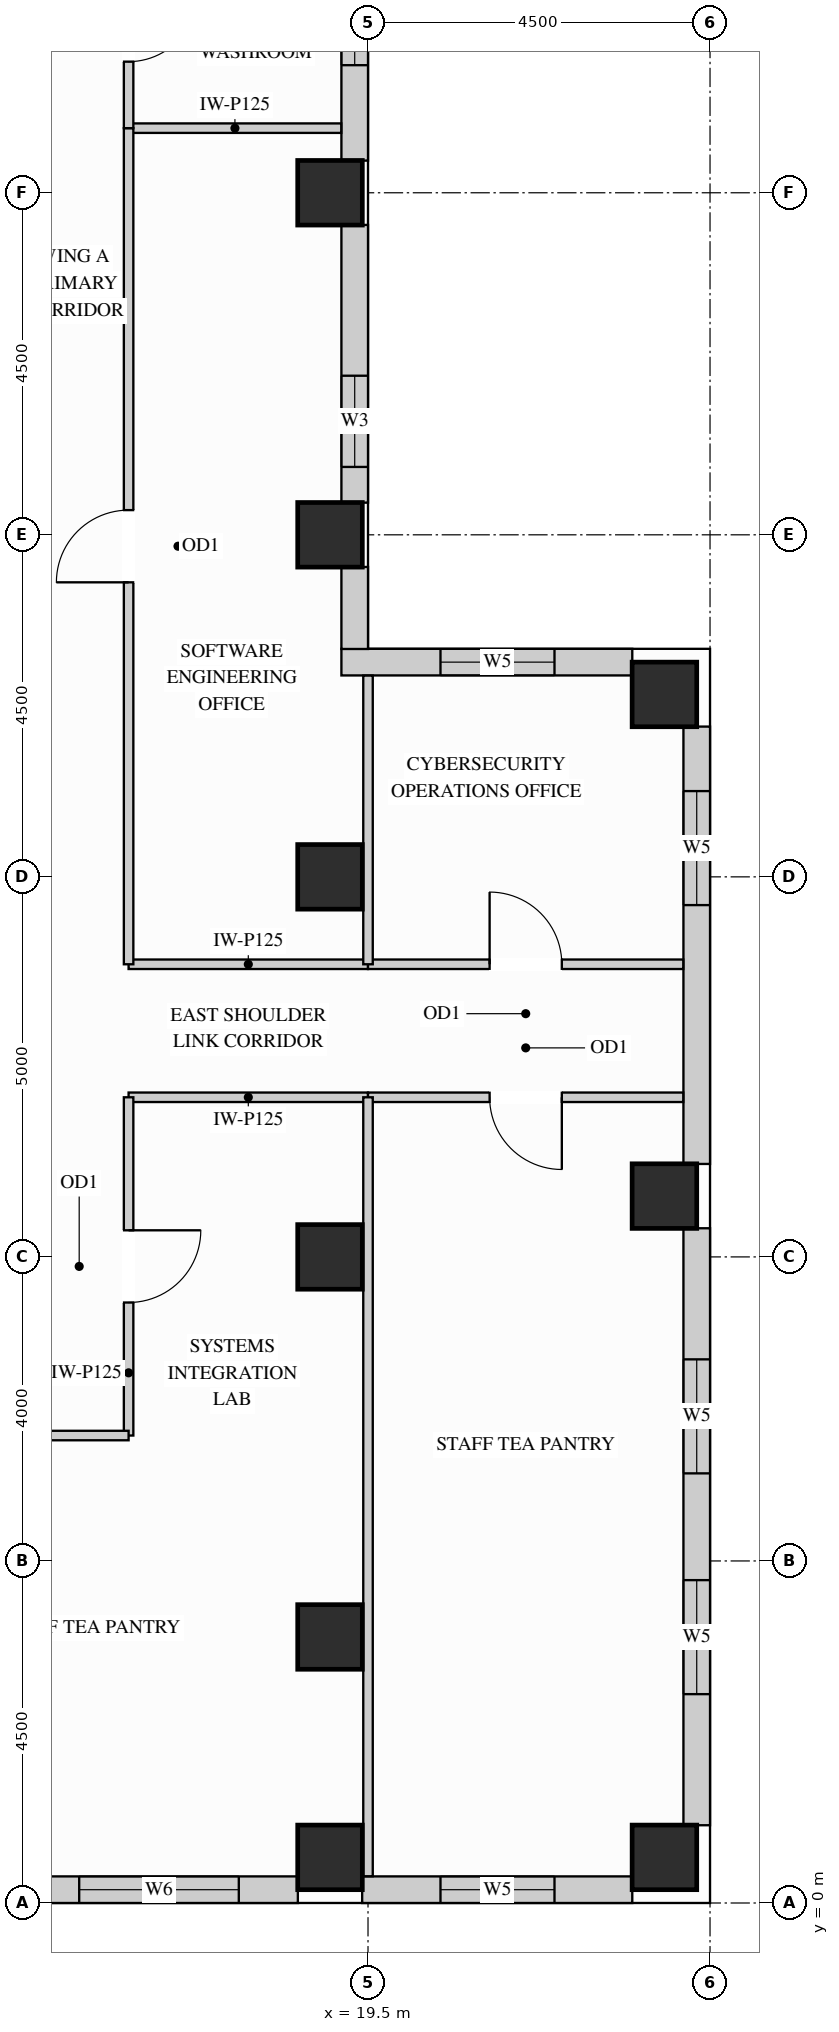
"""IFC4 building model, lengths in metres.
Left out: names, types, materials, properties, quantities, classifications, styles, units other than length and angle.
Written with IfcOpenShell. Run it as: python <this file> out.ifc"""

import sys

from ifc_helpers import new_model, si_unit, direction, frame, frame_2d, origin, origin_2d, place, context, subcontext, project, spatial, rectangle, extrude, source, transform, mapped, element, fill, save


model = new_model("IFC4")
c1 = context("Model", 3, precision=1e-05, world=origin(), true_north=direction((0.0, 1.0)))
c2 = subcontext(c1, "Body", "Model", "MODEL_VIEW")
j1 = project(units=[si_unit("LENGTHUNIT", "METRE"), si_unit("PLANEANGLEUNIT", "RADIAN")], contexts=[c1])
p1 = place(None, origin())
s1 = spatial("IfcSite", under=j1, at=p1, CompositionType="ELEMENT")
p2 = place(p1, origin())
s2 = spatial("IfcBuilding", under=s1, at=p2, CompositionType="ELEMENT")
p3 = place(p2, frame((0.0, 0.0, 273.6)))
s3 = spatial("IfcBuildingStorey", under=s2, at=p3, CompositionType="ELEMENT", Elevation=273.6)
m1 = source(origin(), c2, "Body", "SweptSolid", [
    extrude(rectangle(XDim=0.85, YDim=0.85, at=origin_2d()), origin(), (0.0, 0.0, 1.0), 3.37),
])
for number, where, z_axis, x_axis in (
    (1, (19.0, 13.5, 0.0), (0.0, 0.0, 1.0), (1.0, 0.0, 0.0)),
    (2, (19.0, 18.0, 0.0), (0.0, 0.0, 1.0), (1.0, 0.0, 0.0)),
    (3, (19.0, 22.5, 0.0), (0.0, 0.0, 1.0), (1.0, 0.0, 0.0)),
    (4, (19.0, 3.5, 0.0), (0.0, 0.0, 1.0), (1.0, 0.0, 0.0)),
    (5, (19.0, 8.5, 0.0), (0.0, 0.0, 1.0), (1.0, 0.0, 0.0)),
    (6, (19.0, 0.6, 0.0), (0.0, 0.0, 1.0), (1.0, 0.0, 0.0)),
    (7, (23.4, 0.6, 0.0), (0.0, 0.0, 1.0), (1.0, 0.0, 0.0)),
    (8, (23.4, 15.9, 0.0), (0.0, 0.0, 1.0), (1.0, 0.0, 0.0)),
    (9, (23.4, 9.3, 0.0), (0.0, 0.0, 1.0), (1.0, 0.0, 0.0)),
):
    element("IfcColumn", number, at=place(p3, frame(where, z_axis=z_axis, x_axis=x_axis)), inside=s3, PredefinedType="COLUMN", context=c2, shape_type="MappedRepresentation", body=[
        mapped(m1, transform((0.0, 0.0, 0.0), x_axis=(1.0, 0.0, 0.0), y_axis=(0.0, 1.0, 0.0), z_axis=(0.0, 0.0, 1.0))),
    ])
p4 = place(p3, frame((14.923, 0.175, 0.0), z_axis=(0.0, 0.0, 1.0), x_axis=(1.0, 0.0, 0.0)))
e10 = element("IfcWall", 10, at=p4, inside=s3, PredefinedType="SOLIDWALL", context=c2, shape_type="SweptSolid", body=[
    extrude(rectangle(XDim=3.654, YDim=0.35, at=frame_2d((1.827, 0.0))), origin(), (0.0, 0.0, 1.0), 3.355),
])
p5 = place(p4, frame((0.777, 0.0, 0.78)))
e11 = element("IfcOpeningElement", 11, at=p5, cuts=e10, PredefinedType="OPENING", context=c2, shape_type="SweptSolid", body=[
    extrude(rectangle(XDim=2.1, YDim=2.25, at=frame_2d((1.05, 1.125))), frame((0.0, 0.185, 0.0), z_axis=(0.0, -1.0, 0.0), x_axis=(1.0, 0.0, 0.0)), (0.0, 0.0, 1.0), 0.37),
])
p6 = place(p3, frame((19.423, 0.175, 0.0), z_axis=(0.0, 0.0, 1.0), x_axis=(1.0, 0.0, 0.0)))
e12 = element("IfcWall", 12, at=p6, inside=s3, PredefinedType="SOLIDWALL", context=c2, shape_type="SweptSolid", body=[
    extrude(rectangle(XDim=3.554, YDim=0.35, at=frame_2d((1.777, 0.0))), origin(), (0.0, 0.0, 1.0), 3.355),
])
p7 = place(p6, frame((1.031, 0.0, 0.78)))
e13 = element("IfcOpeningElement", 13, at=p7, cuts=e12, PredefinedType="OPENING", context=c2, shape_type="SweptSolid", body=[
    extrude(rectangle(XDim=1.5, YDim=2.0, at=frame_2d((0.75, 1.0))), frame((0.0, 0.185, 0.0), z_axis=(0.0, -1.0, 0.0), x_axis=(1.0, 0.0, 0.0)), (0.0, 0.0, 1.0), 0.37),
])
p8 = place(p3, frame((23.825, 1.023, 0.0), z_axis=(0.0, 0.0, 1.0), x_axis=(0.0, 1.0, 0.0)))
e14 = element("IfcWall", 14, at=p8, inside=s3, PredefinedType="SOLIDWALL", context=c2, shape_type="SweptSolid", body=[
    extrude(rectangle(XDim=7.854, YDim=0.35, at=frame_2d((3.927, 0.0))), origin(), (0.0, 0.0, 1.0), 3.355),
])
p9 = place(p8, frame((1.725, 0.0, 0.78)))
e15 = element("IfcOpeningElement", 15, at=p9, cuts=e14, PredefinedType="OPENING", context=c2, shape_type="SweptSolid", body=[
    extrude(rectangle(XDim=1.5, YDim=2.0, at=frame_2d((0.75, 1.0))), frame((0.0, 0.185, 0.0), z_axis=(0.0, -1.0, 0.0), x_axis=(1.0, 0.0, 0.0)), (0.0, 0.0, 1.0), 0.37),
])
p10 = place(p8, frame((4.629, 0.0, 0.78)))
e16 = element("IfcOpeningElement", 16, at=p10, cuts=e14, PredefinedType="OPENING", context=c2, shape_type="SweptSolid", body=[
    extrude(rectangle(XDim=1.5, YDim=2.0, at=frame_2d((0.75, 1.0))), frame((0.0, 0.185, 0.0), z_axis=(0.0, -1.0, 0.0), x_axis=(1.0, 0.0, 0.0)), (0.0, 0.0, 1.0), 0.37),
])
p11 = place(p3, frame((23.825, 9.723, 0.0), z_axis=(0.0, 0.0, 1.0), x_axis=(0.0, 1.0, 0.0)))
e17 = element("IfcWall", 17, at=p11, inside=s3, PredefinedType="SOLIDWALL", context=c2, shape_type="SweptSolid", body=[
    extrude(rectangle(XDim=5.754, YDim=0.35, at=frame_2d((2.877, 0.0))), origin(), (0.0, 0.0, 1.0), 3.355),
])
p12 = place(p11, frame((3.406, 0.0, 0.78)))
e18 = element("IfcOpeningElement", 18, at=p12, cuts=e17, PredefinedType="OPENING", context=c2, shape_type="SweptSolid", body=[
    extrude(rectangle(XDim=1.5, YDim=2.0, at=frame_2d((0.75, 1.0))), frame((0.0, 0.185, 0.0), z_axis=(0.0, -1.0, 0.0), x_axis=(1.0, 0.0, 0.0)), (0.0, 0.0, 1.0), 0.37),
])
p13 = place(p3, frame((22.977, 16.325, 0.0), z_axis=(0.0, 0.0, 1.0), x_axis=(-1.0, 0.0, 0.0)))
e19 = element("IfcWall", 19, at=p13, inside=s3, PredefinedType="SOLIDWALL", context=c2, shape_type="SweptSolid", body=[
    extrude(rectangle(XDim=3.827, YDim=0.35, at=frame_2d((1.914, 0.0))), origin(), (0.0, 0.0, 1.0), 3.355),
])
p14 = place(p13, frame((1.023, 0.0, 0.78)))
e20 = element("IfcOpeningElement", 20, at=p14, cuts=e19, PredefinedType="OPENING", context=c2, shape_type="SweptSolid", body=[
    extrude(rectangle(XDim=1.5, YDim=2.0, at=frame_2d((0.75, 1.0))), frame((0.0, 0.185, 0.0), z_axis=(0.0, -1.0, 0.0), x_axis=(1.0, 0.0, 0.0)), (0.0, 0.0, 1.0), 0.37),
])
m2 = source(origin(), c2, "Body", "SweptSolid", [
    extrude(rectangle(XDim=1.079, YDim=0.35, at=frame_2d((0.54, 0.0))), origin(), (0.0, 0.0, 1.0), 2.589),
])
p15 = place(p3, frame((19.325, 16.498, 0.0), z_axis=(0.0, 0.0, 1.0), x_axis=(0.0, 1.0, 0.0)))
e21 = element("IfcWall", 21, at=p15, inside=s3, PredefinedType="SOLIDWALL", context=c2, shape_type="MappedRepresentation", body=[
    mapped(m2, transform((0.0, 0.0, 0.0), x_axis=(1.0, 0.0, 0.0), y_axis=(0.0, 1.0, 0.0), z_axis=(0.0, 0.0, 1.0))),
])
p16 = place(p3, frame((19.325, 18.423, 0.0), z_axis=(0.0, 0.0, 1.0), x_axis=(0.0, 1.0, 0.0)))
e22 = element("IfcWall", 22, at=p16, inside=s3, PredefinedType="SOLIDWALL", context=c2, shape_type="SweptSolid", body=[
    extrude(rectangle(XDim=3.654, YDim=0.35, at=frame_2d((1.827, 0.0))), origin(), (0.0, 0.0, 1.0), 2.589),
])
p17 = place(p16, frame((0.47, 0.0, 0.78)))
e23 = element("IfcOpeningElement", 23, at=p17, cuts=e22, PredefinedType="OPENING", context=c2, shape_type="SweptSolid", body=[
    extrude(rectangle(XDim=1.2, YDim=1.629, at=frame_2d((0.6, 0.814))), frame((0.0, 0.185, 0.0), z_axis=(0.0, -1.0, 0.0), x_axis=(1.0, 0.0, 0.0)), (0.0, 0.0, 1.0), 0.37),
])
p18 = place(p3, frame((19.325, 22.923, 0.0), z_axis=(0.0, 0.0, 1.0), x_axis=(0.0, 1.0, 0.0)))
e24 = element("IfcWall", 24, at=p18, inside=s3, PredefinedType="SOLIDWALL", context=c2, shape_type="SweptSolid", body=[
    extrude(rectangle(XDim=3.454, YDim=0.35, at=frame_2d((1.727, 0.0))), origin(), (0.0, 0.0, 1.0), 2.589),
])
p19 = place(p18, frame((1.256, 0.0, 0.78)))
e25 = element("IfcOpeningElement", 25, at=p19, cuts=e24, PredefinedType="OPENING", context=c2, shape_type="SweptSolid", body=[
    extrude(rectangle(XDim=1.5, YDim=1.629, at=frame_2d((0.75, 0.814))), frame((0.0, 0.185, 0.0), z_axis=(0.0, -1.0, 0.0), x_axis=(1.0, 0.0, 0.0)), (0.0, 0.0, 1.0), 0.37),
])
m3 = source(origin(), c2, "Body", "SweptSolid", [
    extrude(rectangle(XDim=2.798, YDim=0.125, at=frame_2d((1.399, 0.0))), origin(), (0.0, 0.0, 1.0), 3.355),
])
p20 = place(p3, frame((16.35, 23.35, 0.0), z_axis=(0.0, 0.0, 1.0), x_axis=(1.0, 0.0, 0.0)))
e26 = element("IfcWall", 26, at=p20, inside=s3, PredefinedType="PARTITIONING", context=c2, shape_type="MappedRepresentation", body=[
    mapped(m3, transform((0.0, 0.0, 0.0), x_axis=(1.0, 0.0, 0.0), y_axis=(0.0, 1.0, 0.0), z_axis=(0.0, 0.0, 1.0))),
])
m4 = source(origin(), c2, "Body", "SweptSolid", [
    extrude(rectangle(XDim=3.15, YDim=0.125, at=frame_2d((1.575, 0.0))), origin(), (0.0, 0.0, 1.0), 3.355),
])
for number, where, z_axis, x_axis in (
    (27, (16.35, 12.35, 0.0), (0.0, 0.0, 1.0), (1.0, 0.0, 0.0)),
    (28, (16.35, 10.6, 0.0), (0.0, 0.0, 1.0), (1.0, 0.0, 0.0)),
):
    element("IfcWall", number, at=place(p3, frame(where, z_axis=z_axis, x_axis=x_axis)), inside=s3, PredefinedType="PARTITIONING", context=c2, shape_type="MappedRepresentation", body=[
        mapped(m4, transform((0.0, 0.0, 0.0), x_axis=(1.0, 0.0, 0.0), y_axis=(0.0, 1.0, 0.0), z_axis=(0.0, 0.0, 1.0))),
    ])
p21 = place(p3, frame((16.35, 6.15, 0.0), z_axis=(0.0, 0.0, 1.0), x_axis=(0.0, 1.0, 0.0)))
e29 = element("IfcWall", 29, at=p21, inside=s3, PredefinedType="PARTITIONING", context=c2, shape_type="SweptSolid", body=[
    extrude(rectangle(XDim=4.45, YDim=0.125, at=frame_2d((2.225, 0.0))), origin(), (0.0, 0.0, 1.0), 3.355),
])
p22 = place(p21, frame((1.75, 0.0, 0.0)))
e30 = element("IfcOpeningElement", 30, at=p22, cuts=e29, PredefinedType="OPENING", context=c2, shape_type="SweptSolid", body=[
    extrude(rectangle(XDim=0.95, YDim=2.15, at=frame_2d((0.475, 1.075))), frame((0.0, 0.073, 0.0), z_axis=(0.0, -1.0, 0.0), x_axis=(1.0, 0.0, 0.0)), (0.0, 0.0, 1.0), 0.145),
])
p23 = place(p3, frame((16.35, 12.35, 0.0), z_axis=(0.0, 0.0, 1.0), x_axis=(0.0, 1.0, 0.0)))
e31 = element("IfcWall", 31, at=p23, inside=s3, PredefinedType="PARTITIONING", context=c2, shape_type="SweptSolid", body=[
    extrude(rectangle(XDim=11.0, YDim=0.125, at=frame_2d((5.5, 0.0))), origin(), (0.0, 0.0, 1.0), 3.355),
])
p24 = place(p23, frame((5.025, 0.0, 0.0)))
e32 = element("IfcOpeningElement", 32, at=p24, cuts=e31, PredefinedType="OPENING", context=c2, shape_type="SweptSolid", body=[
    extrude(rectangle(XDim=0.95, YDim=2.15, at=frame_2d((0.475, 1.075))), frame((0.0, 0.073, 0.0), z_axis=(0.0, -1.0, 0.0), x_axis=(1.0, 0.0, 0.0)), (0.0, 0.0, 1.0), 0.145),
])
p25 = place(p3, frame((16.35, 23.35, 0.0), z_axis=(0.0, 0.0, 1.0), x_axis=(0.0, 1.0, 0.0)))
e33 = element("IfcWall", 33, at=p25, inside=s3, PredefinedType="PARTITIONING", context=c2, shape_type="SweptSolid", body=[
    extrude(rectangle(XDim=2.7, YDim=0.125, at=frame_2d((1.35, 0.0))), origin(), (0.0, 0.0, 1.0), 3.355),
])
p26 = place(p25, frame((0.875, 0.0, 0.0)))
e34 = element("IfcOpeningElement", 34, at=p26, cuts=e33, PredefinedType="OPENING", context=c2, shape_type="SweptSolid", body=[
    extrude(rectangle(XDim=0.9, YDim=2.15, at=frame_2d((0.45, 1.075))), frame((0.0, 0.073, 0.0), z_axis=(0.0, -1.0, 0.0), x_axis=(1.0, 0.0, 0.0)), (0.0, 0.0, 1.0), 0.145),
])
p27 = place(p3, frame((19.5, 10.6, 0.0), z_axis=(0.0, 0.0, 1.0), x_axis=(1.0, 0.0, 0.0)))
e35 = element("IfcWall", 35, at=p27, inside=s3, PredefinedType="PARTITIONING", context=c2, shape_type="SweptSolid", body=[
    extrude(rectangle(XDim=4.148, YDim=0.125, at=frame_2d((2.074, 0.0))), origin(), (0.0, 0.0, 1.0), 3.355),
])
p28 = place(p27, frame((1.6, 0.0, 0.0)))
e36 = element("IfcOpeningElement", 36, at=p28, cuts=e35, PredefinedType="OPENING", context=c2, shape_type="SweptSolid", body=[
    extrude(rectangle(XDim=0.95, YDim=2.15, at=frame_2d((0.475, 1.075))), frame((0.0, 0.073, 0.0), z_axis=(0.0, -1.0, 0.0), x_axis=(1.0, 0.0, 0.0)), (0.0, 0.0, 1.0), 0.145),
])
p29 = place(p3, frame((19.5, 12.35, 0.0), z_axis=(0.0, 0.0, 1.0), x_axis=(1.0, 0.0, 0.0)))
e37 = element("IfcWall", 37, at=p29, inside=s3, PredefinedType="PARTITIONING", context=c2, shape_type="SweptSolid", body=[
    extrude(rectangle(XDim=4.148, YDim=0.125, at=frame_2d((2.074, 0.0))), origin(), (0.0, 0.0, 1.0), 3.355),
])
p30 = place(p29, frame((1.6, 0.0, 0.0)))
e38 = element("IfcOpeningElement", 38, at=p30, cuts=e37, PredefinedType="OPENING", context=c2, shape_type="SweptSolid", body=[
    extrude(rectangle(XDim=0.95, YDim=2.15, at=frame_2d((0.475, 1.075))), frame((0.0, 0.073, 0.0), z_axis=(0.0, -1.0, 0.0), x_axis=(1.0, 0.0, 0.0)), (0.0, 0.0, 1.0), 0.145),
])
m5 = source(origin(), c2, "Body", "SweptSolid", [
    extrude(rectangle(XDim=10.248, YDim=0.125, at=frame_2d((5.124, 0.0))), origin(), (0.0, 0.0, 1.0), 3.355),
])
p31 = place(p3, frame((19.5, 0.352, 0.0), z_axis=(0.0, 0.0, 1.0), x_axis=(0.0, 1.0, 0.0)))
e39 = element("IfcWall", 39, at=p31, inside=s3, PredefinedType="PARTITIONING", context=c2, shape_type="MappedRepresentation", body=[
    mapped(m5, transform((0.0, 0.0, 0.0), x_axis=(1.0, 0.0, 0.0), y_axis=(0.0, 1.0, 0.0), z_axis=(0.0, 0.0, 1.0))),
])
m6 = source(origin(), c2, "Body", "SweptSolid", [
    extrude(rectangle(XDim=3.798, YDim=0.125, at=frame_2d((1.899, 0.0))), origin(), (0.0, 0.0, 1.0), 3.355),
])
p32 = place(p3, frame((19.5, 12.35, 0.0), z_axis=(0.0, 0.0, 1.0), x_axis=(0.0, 1.0, 0.0)))
e40 = element("IfcWall", 40, at=p32, inside=s3, PredefinedType="PARTITIONING", context=c2, shape_type="MappedRepresentation", body=[
    mapped(m6, transform((0.0, 0.0, 0.0), x_axis=(1.0, 0.0, 0.0), y_axis=(0.0, 1.0, 0.0), z_axis=(0.0, 0.0, 1.0))),
])
p33 = place(p3, frame((10.179, 6.15, 0.0), z_axis=(0.0, 0.0, 1.0), x_axis=(1.0, 0.0, 0.0)))
e41 = element("IfcWall", 41, at=p33, inside=s3, PredefinedType="PARTITIONING", context=c2, shape_type="SweptSolid", body=[
    extrude(rectangle(XDim=6.171, YDim=0.125, at=frame_2d((3.085, 0.0))), origin(), (0.0, 0.0, 1.0), 3.355),
])
p34 = place(p33, frame((2.611, 0.0, 0.0)))
e42 = element("IfcOpeningElement", 42, at=p34, cuts=e41, PredefinedType="OPENING", context=c2, shape_type="SweptSolid", body=[
    extrude(rectangle(XDim=0.95, YDim=2.15, at=frame_2d((0.475, 1.075))), frame((0.0, 0.073, 0.0), z_axis=(0.0, -1.0, 0.0), x_axis=(1.0, 0.0, 0.0)), (0.0, 0.0, 1.0), 0.145),
])
m7 = source(origin(), c2, "Body", "SweptSolid", [
    extrude(rectangle(XDim=0.95, YDim=2.15, at=frame_2d((0.475, 1.075))), frame((0.0, 0.025, 0.0), z_axis=(0.0, -1.0, 0.0), x_axis=(1.0, 0.0, 0.0)), (0.0, 0.0, 1.0), 0.05),
])
p35 = place(p22, origin())
e43 = element("IfcDoor", 43, at=p35, inside=s3, OperationType="SINGLE_SWING_RIGHT", PredefinedType="DOOR", context=c2, shape_type="MappedRepresentation", body=[
    mapped(m7, transform((0.0, 0.0, 0.0), x_axis=(1.0, 0.0, 0.0), y_axis=(0.0, 1.0, 0.0), z_axis=(0.0, 0.0, 1.0))),
])
fill(e30, e43)
p36 = place(p24, origin())
e44 = element("IfcDoor", 44, at=p36, inside=s3, OperationType="SINGLE_SWING_LEFT", PredefinedType="DOOR", context=c2, shape_type="MappedRepresentation", body=[
    mapped(m7, transform((0.0, 0.0, 0.0), x_axis=(1.0, 0.0, 0.0), y_axis=(0.0, 1.0, 0.0), z_axis=(0.0, 0.0, 1.0))),
])
fill(e32, e44)
p37 = place(p28, origin())
e45 = element("IfcDoor", 45, at=p37, inside=s3, OperationType="SINGLE_SWING_RIGHT", PredefinedType="DOOR", context=c2, shape_type="MappedRepresentation", body=[
    mapped(m7, transform((0.0, 0.0, 0.0), x_axis=(1.0, 0.0, 0.0), y_axis=(0.0, 1.0, 0.0), z_axis=(0.0, 0.0, 1.0))),
])
fill(e36, e45)
p38 = place(p30, origin())
e46 = element("IfcDoor", 46, at=p38, inside=s3, OperationType="SINGLE_SWING_LEFT", PredefinedType="DOOR", context=c2, shape_type="MappedRepresentation", body=[
    mapped(m7, transform((0.0, 0.0, 0.0), x_axis=(1.0, 0.0, 0.0), y_axis=(0.0, 1.0, 0.0), z_axis=(0.0, 0.0, 1.0))),
])
fill(e38, e46)
m8 = source(origin(), c2, "Body", "SweptSolid", [
    extrude(rectangle(XDim=0.9, YDim=2.15, at=frame_2d((0.45, 1.075))), frame((0.0, 0.025, 0.0), z_axis=(0.0, -1.0, 0.0), x_axis=(1.0, 0.0, 0.0)), (0.0, 0.0, 1.0), 0.05),
])
p39 = place(p26, origin())
e47 = element("IfcDoor", 47, at=p39, inside=s3, OperationType="SINGLE_SWING_RIGHT", PredefinedType="DOOR", context=c2, shape_type="MappedRepresentation", body=[
    mapped(m8, transform((0.0, 0.0, 0.0), x_axis=(1.0, 0.0, 0.0), y_axis=(0.0, 1.0, 0.0), z_axis=(0.0, 0.0, 1.0))),
])
fill(e34, e47)
m9 = source(origin(), c2, "Body", "SweptSolid", [
    extrude(rectangle(XDim=1.2, YDim=1.629, at=frame_2d((0.6, 0.814))), frame((0.0, 0.03, 0.0), z_axis=(0.0, -1.0, 0.0), x_axis=(1.0, 0.0, 0.0)), (0.0, 0.0, 1.0), 0.06),
])
p40 = place(p17, origin())
e48 = element("IfcWindow", 48, at=p40, inside=s3, PartitioningType="SINGLE_PANEL", PredefinedType="WINDOW", context=c2, shape_type="MappedRepresentation", body=[
    mapped(m9, transform((0.0, 0.0, 0.0), x_axis=(1.0, 0.0, 0.0), y_axis=(0.0, 1.0, 0.0), z_axis=(0.0, 0.0, 1.0))),
])
fill(e23, e48)
m10 = source(origin(), c2, "Body", "SweptSolid", [
    extrude(rectangle(XDim=1.5, YDim=2.0, at=frame_2d((0.75, 1.0))), frame((0.0, 0.03, 0.0), z_axis=(0.0, -1.0, 0.0), x_axis=(1.0, 0.0, 0.0)), (0.0, 0.0, 1.0), 0.06),
])
p41 = place(p7, origin())
e49 = element("IfcWindow", 49, at=p41, inside=s3, PartitioningType="SINGLE_PANEL", PredefinedType="WINDOW", context=c2, shape_type="MappedRepresentation", body=[
    mapped(m10, transform((0.0, 0.0, 0.0), x_axis=(1.0, 0.0, 0.0), y_axis=(0.0, 1.0, 0.0), z_axis=(0.0, 0.0, 1.0))),
])
fill(e13, e49)
p42 = place(p9, origin())
e50 = element("IfcWindow", 50, at=p42, inside=s3, PartitioningType="SINGLE_PANEL", PredefinedType="WINDOW", context=c2, shape_type="MappedRepresentation", body=[
    mapped(m10, transform((0.0, 0.0, 0.0), x_axis=(1.0, 0.0, 0.0), y_axis=(0.0, 1.0, 0.0), z_axis=(0.0, 0.0, 1.0))),
])
fill(e15, e50)
p43 = place(p10, origin())
e51 = element("IfcWindow", 51, at=p43, inside=s3, PartitioningType="SINGLE_PANEL", PredefinedType="WINDOW", context=c2, shape_type="MappedRepresentation", body=[
    mapped(m10, transform((0.0, 0.0, 0.0), x_axis=(1.0, 0.0, 0.0), y_axis=(0.0, 1.0, 0.0), z_axis=(0.0, 0.0, 1.0))),
])
fill(e16, e51)
p44 = place(p12, origin())
e52 = element("IfcWindow", 52, at=p44, inside=s3, PartitioningType="SINGLE_PANEL", PredefinedType="WINDOW", context=c2, shape_type="MappedRepresentation", body=[
    mapped(m10, transform((0.0, 0.0, 0.0), x_axis=(1.0, 0.0, 0.0), y_axis=(0.0, 1.0, 0.0), z_axis=(0.0, 0.0, 1.0))),
])
fill(e18, e52)
p45 = place(p14, origin())
e53 = element("IfcWindow", 53, at=p45, inside=s3, PartitioningType="SINGLE_PANEL", PredefinedType="WINDOW", context=c2, shape_type="MappedRepresentation", body=[
    mapped(m10, transform((0.0, 0.0, 0.0), x_axis=(1.0, 0.0, 0.0), y_axis=(0.0, 1.0, 0.0), z_axis=(0.0, 0.0, 1.0))),
])
fill(e20, e53)
m11 = source(origin(), c2, "Body", "SweptSolid", [
    extrude(rectangle(XDim=1.5, YDim=1.629, at=frame_2d((0.75, 0.814))), frame((0.0, 0.03, 0.0), z_axis=(0.0, -1.0, 0.0), x_axis=(1.0, 0.0, 0.0)), (0.0, 0.0, 1.0), 0.06),
])
p46 = place(p19, origin())
e54 = element("IfcWindow", 54, at=p46, inside=s3, PartitioningType="SINGLE_PANEL", PredefinedType="WINDOW", context=c2, shape_type="MappedRepresentation", body=[
    mapped(m11, transform((0.0, 0.0, 0.0), x_axis=(1.0, 0.0, 0.0), y_axis=(0.0, 1.0, 0.0), z_axis=(0.0, 0.0, 1.0))),
])
fill(e25, e54)
m12 = source(origin(), c2, "Body", "SweptSolid", [
    extrude(rectangle(XDim=2.1, YDim=2.25, at=frame_2d((1.05, 1.125))), frame((0.0, 0.03, 0.0), z_axis=(0.0, -1.0, 0.0), x_axis=(1.0, 0.0, 0.0)), (0.0, 0.0, 1.0), 0.06),
])
p47 = place(p5, origin())
e55 = element("IfcWindow", 55, at=p47, inside=s3, PartitioningType="SINGLE_PANEL", PredefinedType="WINDOW", context=c2, shape_type="MappedRepresentation", body=[
    mapped(m12, transform((0.0, 0.0, 0.0), x_axis=(1.0, 0.0, 0.0), y_axis=(0.0, 1.0, 0.0), z_axis=(0.0, 0.0, 1.0))),
])
fill(e11, e55)
save(model, sys.argv[1])
